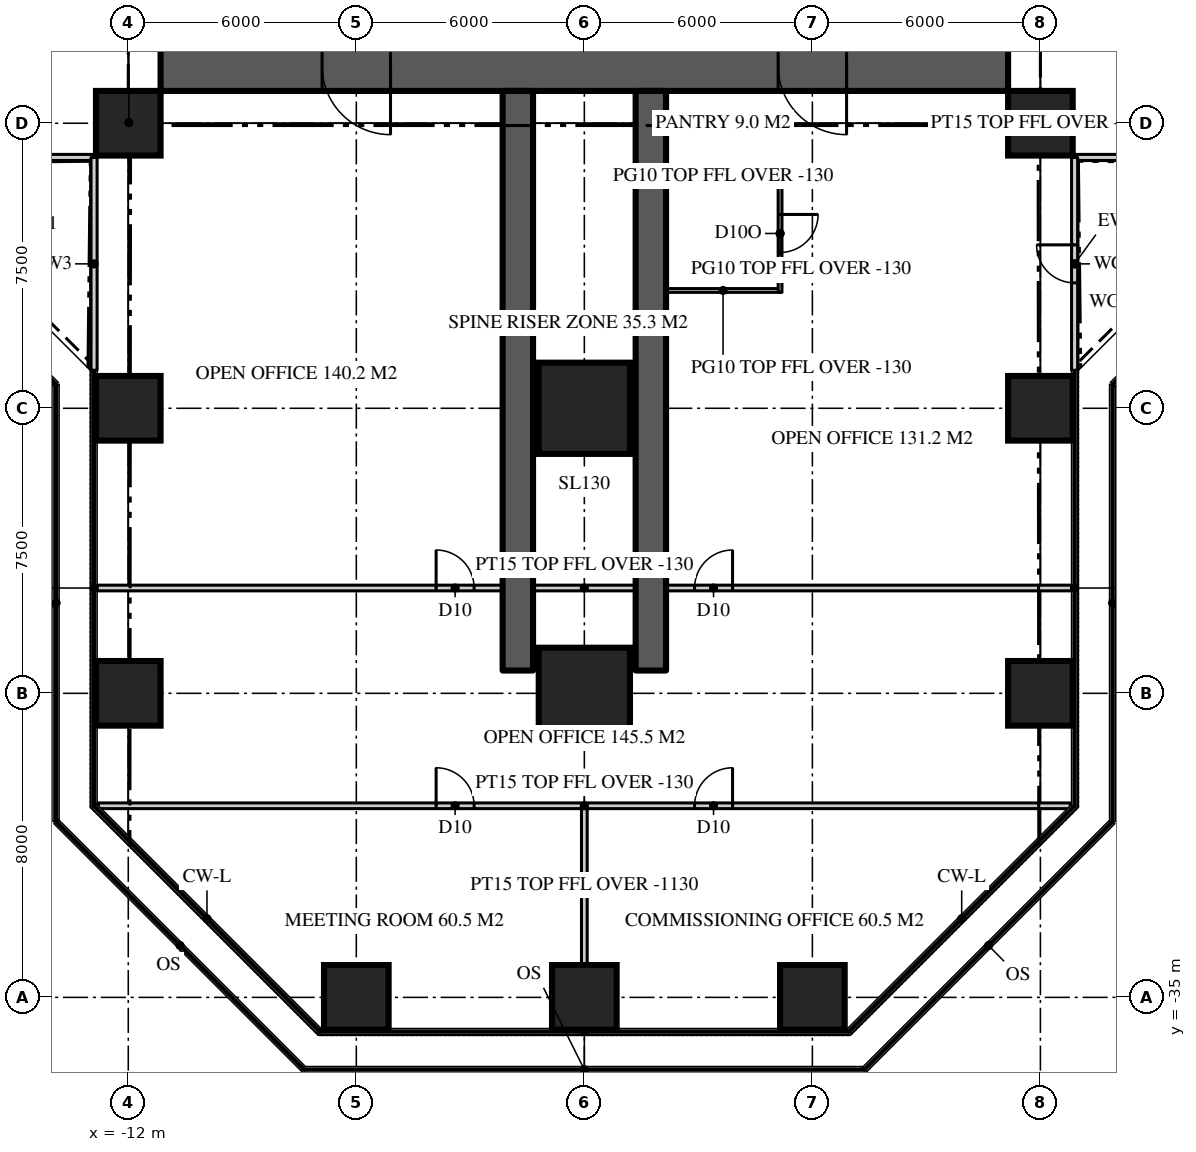
"""IFC4 building model, lengths in metres.
Left out: names, types, materials, properties, quantities, classifications, styles, units other than length and angle.
Written with IfcOpenShell. Run it as: python <this file> out.ifc"""

import sys

from ifc_helpers import new_model, si_unit, direction, frame, frame_2d, origin, origin_2d, place, context, subcontext, project, spatial, rectangle, extrude, element, fill, save


model = new_model("IFC4")
c1 = context("Model", 3, precision=1e-05, world=origin(), true_north=direction((0.0, 1.0)))
c2 = subcontext(c1, "Body", "Model", "MODEL_VIEW")
j1 = project(units=[si_unit("LENGTHUNIT", "METRE"), si_unit("PLANEANGLEUNIT", "RADIAN")], contexts=[c1])
p1 = place(None, origin())
s1 = spatial("IfcSite", under=j1, at=p1, CompositionType="ELEMENT")
p2 = place(p1, origin())
s2 = spatial("IfcBuilding", under=s1, at=p2, CompositionType="ELEMENT")
p3 = place(p2, frame((0.0, 0.0, 86.4)))
s3 = spatial("IfcBuildingStorey", under=s2, at=p3, CompositionType="ELEMENT", Elevation=86.4)
p4 = place(p3, frame((11.15, -10.5, 0.0), z_axis=(0.0, 0.0, 1.0), x_axis=(-1.0, 0.0, 0.0)))
e1 = element("IfcWall", 1, at=p4, inside=s3, PredefinedType="SHEAR", context=c2, shape_type="SweptSolid", body=[
    extrude(rectangle(XDim=22.3, YDim=1.3, at=frame_2d((11.15, 0.0))), origin(), (0.0, 0.0, 1.0), 3.9),
])
p5 = place(p4, frame((16.25, 0.0, 0.0)))
e2 = element("IfcOpeningElement", 2, at=p5, cuts=e1, PredefinedType="OPENING", context=c2, shape_type="SweptSolid", body=[
    extrude(rectangle(XDim=1.8, YDim=2.2, at=frame_2d((0.9, 1.1))), frame((0.0, 0.66, 0.0), z_axis=(0.0, -1.0, 0.0), x_axis=(1.0, 0.0, 0.0)), (0.0, 0.0, 1.0), 1.32),
])
p6 = place(p4, frame((4.25, 0.0, 0.0)))
e3 = element("IfcOpeningElement", 3, at=p6, cuts=e1, PredefinedType="OPENING", context=c2, shape_type="SweptSolid", body=[
    extrude(rectangle(XDim=1.8, YDim=2.2, at=frame_2d((0.9, 1.1))), frame((0.0, 0.66, 0.0), z_axis=(0.0, -1.0, 0.0), x_axis=(1.0, 0.0, 0.0)), (0.0, 0.0, 1.0), 1.32),
])
for number, where, z_axis, x_axis in (
    (4, (-1.75, -11.15, 0.0), (0.0, 0.0, 1.0), (0.0, -1.0, 0.0)),
    (5, (1.75, -11.15, 0.0), (0.0, 0.0, 1.0), (0.0, -1.0, 0.0)),
):
    element("IfcWall", number, at=place(p3, frame(where, z_axis=z_axis, x_axis=x_axis)), inside=s3, PredefinedType="SHEAR", context=c2, shape_type="SweptSolid", body=[
        extrude(rectangle(XDim=15.25, YDim=0.8, at=frame_2d((7.625, 0.0))), origin(), (0.0, 0.0, 1.0), 3.9),
    ])
for number, where, z_axis, x_axis in (
    (6, (-6.0, -35.0, 0.0), (0.0, 0.0, 1.0), (1.0, 0.0, 0.0)),
    (7, (0.0, -35.0, 0.0), (0.0, 0.0, 1.0), (1.0, 0.0, 0.0)),
    (8, (6.0, -35.0, 0.0), (0.0, 0.0, 1.0), (1.0, 0.0, 0.0)),
    (9, (-12.0, -27.0, 0.0), (0.0, 0.0, 1.0), (1.0, 0.0, 0.0)),
):
    element("IfcColumn", number, at=place(p3, frame(where, z_axis=z_axis, x_axis=x_axis)), inside=s3, PredefinedType="COLUMN", context=c2, shape_type="SweptSolid", body=[
        extrude(rectangle(XDim=1.7, YDim=1.7, at=origin_2d()), origin(), (0.0, 0.0, 1.0), 3.9),
    ])
p7 = place(p3, frame((0.0, -27.0, 0.0), z_axis=(0.0, 0.0, 1.0), x_axis=(1.0, 0.0, 0.0)))
e10 = element("IfcColumn", 10, at=p7, inside=s3, PredefinedType="COLUMN", context=c2, shape_type="SweptSolid", body=[
    extrude(rectangle(XDim=2.4, YDim=2.4, at=origin_2d()), origin(), (0.0, 0.0, 1.0), 3.9),
])
for number, where, z_axis, x_axis in (
    (11, (12.0, -27.0, 0.0), (0.0, 0.0, 1.0), (1.0, 0.0, 0.0)),
    (12, (-12.0, -19.5, 0.0), (0.0, 0.0, 1.0), (1.0, 0.0, 0.0)),
):
    element("IfcColumn", number, at=place(p3, frame(where, z_axis=z_axis, x_axis=x_axis)), inside=s3, PredefinedType="COLUMN", context=c2, shape_type="SweptSolid", body=[
        extrude(rectangle(XDim=1.7, YDim=1.7, at=origin_2d()), origin(), (0.0, 0.0, 1.0), 3.9),
    ])
p8 = place(p3, frame((0.0, -19.5, 0.0), z_axis=(0.0, 0.0, 1.0), x_axis=(1.0, 0.0, 0.0)))
e13 = element("IfcColumn", 13, at=p8, inside=s3, PredefinedType="COLUMN", context=c2, shape_type="SweptSolid", body=[
    extrude(rectangle(XDim=2.4, YDim=2.4, at=origin_2d()), origin(), (0.0, 0.0, 1.0), 3.9),
])
for number, where, z_axis, x_axis in (
    (14, (12.0, -19.5, 0.0), (0.0, 0.0, 1.0), (1.0, 0.0, 0.0)),
    (15, (-12.0, -12.0, 0.0), (0.0, 0.0, 1.0), (1.0, 0.0, 0.0)),
    (16, (12.0, -12.0, 0.0), (0.0, 0.0, 1.0), (1.0, 0.0, 0.0)),
):
    element("IfcColumn", number, at=place(p3, frame(where, z_axis=z_axis, x_axis=x_axis)), inside=s3, PredefinedType="COLUMN", context=c2, shape_type="SweptSolid", body=[
        extrude(rectangle(XDim=1.7, YDim=1.7, at=origin_2d()), origin(), (0.0, 0.0, 1.0), 3.9),
    ])
p9 = place(p3, frame((12.9, -12.9, 0.0), z_axis=(0.0, 0.0, 1.0), x_axis=(1.0, 0.0, 0.0)))
e17 = element("IfcWall", 17, at=p9, inside=s3, PredefinedType="SOLIDWALL", context=c2, shape_type="SweptSolid", body=[
    extrude(rectangle(XDim=5.6, YDim=0.16, at=frame_2d((2.8, 0.0))), origin(), (0.0, 0.0, 1.0), 3.77),
])
p10 = place(p3, frame((-18.5, -12.9, 0.0), z_axis=(0.0, 0.0, 1.0), x_axis=(1.0, 0.0, 0.0)))
e18 = element("IfcWall", 18, at=p10, inside=s3, PredefinedType="SOLIDWALL", context=c2, shape_type="SweptSolid", body=[
    extrude(rectangle(XDim=5.6, YDim=0.16, at=frame_2d((2.8, 0.0))), origin(), (0.0, 0.0, 1.0), 3.77),
])
p11 = place(p10, frame((2.3, 0.0, 0.0)))
e19 = element("IfcOpeningElement", 19, at=p11, cuts=e18, PredefinedType="OPENING", context=c2, shape_type="SweptSolid", body=[
    extrude(rectangle(XDim=1.0, YDim=2.2, at=frame_2d((0.5, 1.1))), frame((0.0, 0.09, 0.0), z_axis=(0.0, -1.0, 0.0), x_axis=(1.0, 0.0, 0.0)), (0.0, 0.0, 1.0), 0.18),
])
p12 = place(p3, frame((-12.9, -12.9, 0.0), z_axis=(0.0, 0.0, 1.0), x_axis=(0.0, -1.0, 0.0)))
e20 = element("IfcWall", 20, at=p12, inside=s3, PredefinedType="SOLIDWALL", context=c2, shape_type="SweptSolid", body=[
    extrude(rectangle(XDim=5.6, YDim=0.16, at=frame_2d((2.8, 0.0))), origin(), (0.0, 0.0, 1.0), 3.77),
])
p13 = place(p3, frame((12.9, -18.5, 0.0), z_axis=(0.0, 0.0, 1.0), x_axis=(0.0, 1.0, 0.0)))
e21 = element("IfcWall", 21, at=p13, inside=s3, PredefinedType="SOLIDWALL", context=c2, shape_type="SweptSolid", body=[
    extrude(rectangle(XDim=5.6, YDim=0.16, at=frame_2d((2.8, 0.0))), origin(), (0.0, 0.0, 1.0), 3.77),
])
p14 = place(p13, frame((2.3, 0.0, 0.0)))
e22 = element("IfcOpeningElement", 22, at=p14, cuts=e21, PredefinedType="OPENING", context=c2, shape_type="SweptSolid", body=[
    extrude(rectangle(XDim=1.0, YDim=2.2, at=frame_2d((0.5, 1.1))), frame((0.0, 0.09, 0.0), z_axis=(0.0, -1.0, 0.0), x_axis=(1.0, 0.0, 0.0)), (0.0, 0.0, 1.0), 0.18),
])
p15 = place(p3, frame((-12.82, -24.229, 0.0), z_axis=(0.0, 0.0, 1.0), x_axis=(1.0, 0.0, 0.0)))
e23 = element("IfcWall", 23, at=p15, inside=s3, PredefinedType="PARTITIONING", context=c2, shape_type="SweptSolid", body=[
    extrude(rectangle(XDim=25.64, YDim=0.15, at=frame_2d((12.82, 0.0))), origin(), (0.0, 0.0, 1.0), 3.77),
])
p16 = place(p15, frame((15.72, 0.0, 0.0)))
e24 = element("IfcOpeningElement", 24, at=p16, cuts=e23, PredefinedType="OPENING", context=c2, shape_type="SweptSolid", body=[
    extrude(rectangle(XDim=1.0, YDim=2.2, at=frame_2d((0.5, 1.1))), frame((0.0, 0.085, 0.0), z_axis=(0.0, -1.0, 0.0), x_axis=(1.0, 0.0, 0.0)), (0.0, 0.0, 1.0), 0.17),
])
p17 = place(p15, frame((8.92, 0.0, 0.0)))
e25 = element("IfcOpeningElement", 25, at=p17, cuts=e23, PredefinedType="OPENING", context=c2, shape_type="SweptSolid", body=[
    extrude(rectangle(XDim=1.0, YDim=2.2, at=frame_2d((0.5, 1.1))), frame((0.0, 0.085, 0.0), z_axis=(0.0, -1.0, 0.0), x_axis=(1.0, 0.0, 0.0)), (0.0, 0.0, 1.0), 0.17),
])
p18 = place(p3, frame((-12.786, -29.959, 0.0), z_axis=(0.0, 0.0, 1.0), x_axis=(1.0, 0.0, 0.0)))
e26 = element("IfcWall", 26, at=p18, inside=s3, PredefinedType="PARTITIONING", context=c2, shape_type="SweptSolid", body=[
    extrude(rectangle(XDim=25.573, YDim=0.15, at=frame_2d((12.786, 0.0))), origin(), (0.0, 0.0, 1.0), 3.77),
])
p19 = place(p18, frame((15.687, 0.0, 0.0)))
e27 = element("IfcOpeningElement", 27, at=p19, cuts=e26, PredefinedType="OPENING", context=c2, shape_type="SweptSolid", body=[
    extrude(rectangle(XDim=1.0, YDim=2.2, at=frame_2d((0.5, 1.1))), frame((0.0, 0.085, 0.0), z_axis=(0.0, -1.0, 0.0), x_axis=(1.0, 0.0, 0.0)), (0.0, 0.0, 1.0), 0.17),
])
p20 = place(p18, frame((8.886, 0.0, 0.0)))
e28 = element("IfcOpeningElement", 28, at=p20, cuts=e26, PredefinedType="OPENING", context=c2, shape_type="SweptSolid", body=[
    extrude(rectangle(XDim=1.0, YDim=2.2, at=frame_2d((0.5, 1.1))), frame((0.0, 0.085, 0.0), z_axis=(0.0, -1.0, 0.0), x_axis=(1.0, 0.0, 0.0)), (0.0, 0.0, 1.0), 0.17),
])
p21 = place(p3, frame((0.0, -29.959, 0.0), z_axis=(0.0, 0.0, 1.0), x_axis=(0.0, -1.0, 0.0)))
e29 = element("IfcWall", 29, at=p21, inside=s3, PredefinedType="PARTITIONING", context=c2, shape_type="SweptSolid", body=[
    extrude(rectangle(XDim=4.191, YDim=0.15, at=frame_2d((2.095, 0.0))), origin(), (0.0, 0.0, 1.0), 2.77),
])
for number, where, z_axis, x_axis in (
    (30, (2.15, -13.4, 0.0), (0.0, 0.0, 1.0), (1.0, 0.0, 0.0)),
    (31, (2.15, -16.4, 0.0), (0.0, 0.0, 1.0), (1.0, 0.0, 0.0)),
):
    element("IfcWall", number, at=place(p3, frame(where, z_axis=z_axis, x_axis=x_axis)), inside=s3, PredefinedType="PARTITIONING", context=c2, shape_type="SweptSolid", body=[
        extrude(rectangle(XDim=3.0, YDim=0.1, at=frame_2d((1.5, 0.0))), origin(), (0.0, 0.0, 1.0), 3.77),
    ])
p22 = place(p3, frame((5.15, -13.35, 0.0), z_axis=(0.0, 0.0, 1.0), x_axis=(0.0, -1.0, 0.0)))
e32 = element("IfcWall", 32, at=p22, inside=s3, PredefinedType="PARTITIONING", context=c2, shape_type="SweptSolid", body=[
    extrude(rectangle(XDim=3.1, YDim=0.1, at=frame_2d((1.55, 0.0))), origin(), (0.0, 0.0, 1.0), 3.77),
])
p23 = place(p22, frame((1.05, 0.0, 0.0)))
e33 = element("IfcOpeningElement", 33, at=p23, cuts=e32, PredefinedType="OPENING", context=c2, shape_type="SweptSolid", body=[
    extrude(rectangle(XDim=1.0, YDim=2.2, at=frame_2d((0.5, 1.1))), frame((0.0, 0.06, 0.0), z_axis=(0.0, -1.0, 0.0), x_axis=(1.0, 0.0, 0.0)), (0.0, 0.0, 1.0), 0.12),
])
for number, where, z_axis, x_axis in (
    (34, (-11.15, -11.15, 0.0), (0.0, 0.0, 1.0), (-0.707, -0.707, 0.0)),
    (35, (11.15, -11.15, 0.0), (0.0, 0.0, 1.0), (0.707, -0.707, 0.0)),
):
    element("IfcWall", number, at=place(p3, frame(where, z_axis=z_axis, x_axis=x_axis)), inside=s3, PredefinedType="PARTITIONING", context=c2, shape_type="SweptSolid", body=[
        extrude(rectangle(XDim=2.362, YDim=0.15, at=frame_2d((1.181, 0.0))), origin(), (0.0, 0.0, 1.0), 3.22),
    ])
p24 = place(p14, origin())
e36 = element("IfcDoor", 36, at=p24, inside=s3, OperationType="SINGLE_SWING_RIGHT", PredefinedType="DOOR", context=c2, shape_type="SweptSolid", body=[
    extrude(rectangle(XDim=1.0, YDim=2.2, at=frame_2d((0.5, 1.1))), frame((0.0, 0.025, 0.0), z_axis=(0.0, -1.0, 0.0), x_axis=(1.0, 0.0, 0.0)), (0.0, 0.0, 1.0), 0.05),
])
fill(e22, e36)
p25 = place(p5, origin())
e37 = element("IfcDoor", 37, at=p25, inside=s3, OperationType="DOUBLE_DOOR_DOUBLE_SWING", PredefinedType="DOOR", context=c2, shape_type="SweptSolid", body=[
    extrude(rectangle(XDim=1.8, YDim=2.2, at=frame_2d((0.9, 1.1))), frame((0.0, 0.025, 0.0), z_axis=(0.0, -1.0, 0.0), x_axis=(1.0, 0.0, 0.0)), (0.0, 0.0, 1.0), 0.05),
])
fill(e2, e37)
p26 = place(p6, origin())
e38 = element("IfcDoor", 38, at=p26, inside=s3, OperationType="DOUBLE_DOOR_DOUBLE_SWING", PredefinedType="DOOR", context=c2, shape_type="SweptSolid", body=[
    extrude(rectangle(XDim=1.8, YDim=2.2, at=frame_2d((0.9, 1.1))), frame((0.0, 0.025, 0.0), z_axis=(0.0, -1.0, 0.0), x_axis=(1.0, 0.0, 0.0)), (0.0, 0.0, 1.0), 0.05),
])
fill(e3, e38)
p27 = place(p16, origin())
e39 = element("IfcDoor", 39, at=p27, inside=s3, OperationType="SINGLE_SWING_RIGHT", PredefinedType="DOOR", context=c2, shape_type="SweptSolid", body=[
    extrude(rectangle(XDim=1.0, YDim=2.2, at=frame_2d((0.5, 1.1))), frame((0.0, 0.025, 0.0), z_axis=(0.0, -1.0, 0.0), x_axis=(1.0, 0.0, 0.0)), (0.0, 0.0, 1.0), 0.05),
])
fill(e24, e39)
p28 = place(p17, origin())
e40 = element("IfcDoor", 40, at=p28, inside=s3, OperationType="SINGLE_SWING_LEFT", PredefinedType="DOOR", context=c2, shape_type="SweptSolid", body=[
    extrude(rectangle(XDim=1.0, YDim=2.2, at=frame_2d((0.5, 1.1))), frame((0.0, 0.025, 0.0), z_axis=(0.0, -1.0, 0.0), x_axis=(1.0, 0.0, 0.0)), (0.0, 0.0, 1.0), 0.05),
])
fill(e25, e40)
p29 = place(p19, origin())
e41 = element("IfcDoor", 41, at=p29, inside=s3, OperationType="SINGLE_SWING_RIGHT", PredefinedType="DOOR", context=c2, shape_type="SweptSolid", body=[
    extrude(rectangle(XDim=1.0, YDim=2.2, at=frame_2d((0.5, 1.1))), frame((0.0, 0.025, 0.0), z_axis=(0.0, -1.0, 0.0), x_axis=(1.0, 0.0, 0.0)), (0.0, 0.0, 1.0), 0.05),
])
fill(e27, e41)
p30 = place(p20, origin())
e42 = element("IfcDoor", 42, at=p30, inside=s3, OperationType="SINGLE_SWING_LEFT", PredefinedType="DOOR", context=c2, shape_type="SweptSolid", body=[
    extrude(rectangle(XDim=1.0, YDim=2.2, at=frame_2d((0.5, 1.1))), frame((0.0, 0.025, 0.0), z_axis=(0.0, -1.0, 0.0), x_axis=(1.0, 0.0, 0.0)), (0.0, 0.0, 1.0), 0.05),
])
fill(e28, e42)
p31 = place(p23, origin())
e43 = element("IfcDoor", 43, at=p31, inside=s3, OperationType="SINGLE_SWING_LEFT", PredefinedType="DOOR", context=c2, shape_type="SweptSolid", body=[
    extrude(rectangle(XDim=1.0, YDim=2.2, at=frame_2d((0.5, 1.1))), frame((0.0, 0.025, 0.0), z_axis=(0.0, -1.0, 0.0), x_axis=(1.0, 0.0, 0.0)), (0.0, 0.0, 1.0), 0.05),
])
fill(e33, e43)
save(model, sys.argv[1])
